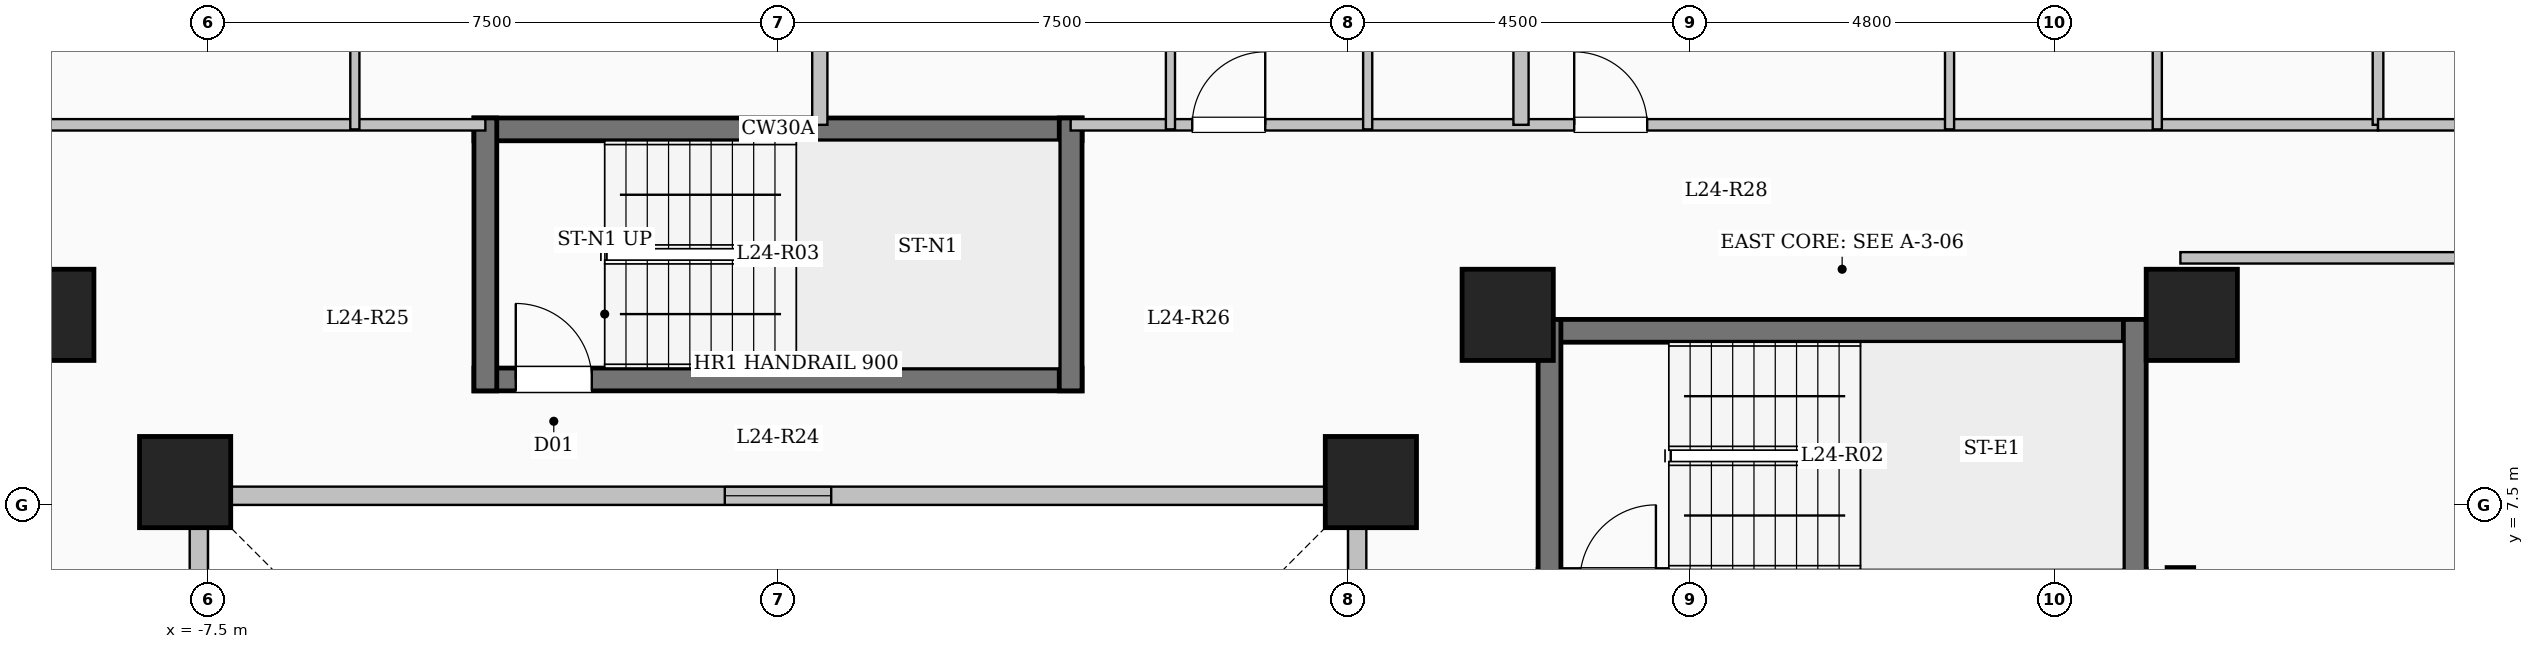
"""IFC4 building model, lengths in metres.
Left out: names, types, materials, properties, quantities, classifications, styles, units other than length and angle.
Written with IfcOpenShell. Run it as: python <this file> out.ifc"""

import sys

from ifc_helpers import new_model, si_unit, direction, frame, frame_2d, origin, origin_2d, place, context, subcontext, project, spatial, rectangle, extrude, element, fill, save


model = new_model("IFC4")
c1 = context("Model", 3, precision=1e-05, world=origin(), true_north=direction((0.0, 1.0)))
c2 = subcontext(c1, "Body", "Model", "MODEL_VIEW")
j1 = project(units=[si_unit("LENGTHUNIT", "METRE"), si_unit("PLANEANGLEUNIT", "RADIAN")], contexts=[c1])
p1 = place(None, origin())
s1 = spatial("IfcSite", under=j1, at=p1, CompositionType="ELEMENT")
p2 = place(p1, origin())
s2 = spatial("IfcBuilding", under=s1, at=p2, CompositionType="ELEMENT")
p3 = place(p2, frame((0.0, 0.0, 91.7)))
s3 = spatial("IfcBuildingStorey", under=s2, at=p3, CompositionType="ELEMENT", Elevation=91.7)
for number, where, z_axis, x_axis in (
    (1, (-7.8, 7.8, 0.0), (0.0, 0.0, 1.0), (1.0, 0.0, 0.0)),
    (2, (7.8, 7.8, 0.0), (0.0, 0.0, 1.0), (1.0, 0.0, 0.0)),
    (3, (-9.6, 10.0, 0.0), (0.0, 0.0, 1.0), (1.0, 0.0, 0.0)),
    (4, (9.6, 10.0, 0.0), (0.0, 0.0, 1.0), (1.0, 0.0, 0.0)),
    (5, (18.6, 10.0, 0.0), (0.0, 0.0, 1.0), (1.0, 0.0, 0.0)),
):
    element("IfcColumn", number, at=place(p3, frame(where, z_axis=z_axis, x_axis=x_axis)), inside=s3, PredefinedType="COLUMN", context=c2, shape_type="SweptSolid", body=[
        extrude(rectangle(XDim=1.2, YDim=1.2, at=origin_2d()), origin(), (0.0, 0.0, 1.0), 3.35),
    ])
p4 = place(p3, frame((7.62, -7.62, 0.0), z_axis=(0.0, 0.0, 1.0), x_axis=(0.0, 1.0, 0.0)))
e6 = element("IfcWall", 6, at=p4, inside=s3, PredefinedType="SOLIDWALL", context=c2, shape_type="SweptSolid", body=[
    extrude(rectangle(XDim=15.24, YDim=0.24, at=frame_2d((7.62, 0.0))), origin(), (0.0, 0.0, 1.0), 3.1),
])
p5 = place(p4, frame((6.92, 0.0, 0.95)))
e7 = element("IfcOpeningElement", 7, at=p5, cuts=e6, PredefinedType="OPENING", context=c2, shape_type="SweptSolid", body=[
    extrude(rectangle(XDim=1.4, YDim=1.5, at=frame_2d((0.7, 0.75))), frame((0.0, 0.13, 0.0), z_axis=(0.0, -1.0, 0.0), x_axis=(1.0, 0.0, 0.0)), (0.0, 0.0, 1.0), 0.26),
])
p6 = place(p3, frame((7.62, 7.62, 0.0), z_axis=(0.0, 0.0, 1.0), x_axis=(-1.0, 0.0, 0.0)))
e8 = element("IfcWall", 8, at=p6, inside=s3, PredefinedType="SOLIDWALL", context=c2, shape_type="SweptSolid", body=[
    extrude(rectangle(XDim=15.24, YDim=0.24, at=frame_2d((7.62, 0.0))), origin(), (0.0, 0.0, 1.0), 3.1),
])
p7 = place(p6, frame((6.92, 0.0, 0.95)))
e9 = element("IfcOpeningElement", 9, at=p7, cuts=e8, PredefinedType="OPENING", context=c2, shape_type="SweptSolid", body=[
    extrude(rectangle(XDim=1.4, YDim=1.5, at=frame_2d((0.7, 0.75))), frame((0.0, 0.13, 0.0), z_axis=(0.0, -1.0, 0.0), x_axis=(1.0, 0.0, 0.0)), (0.0, 0.0, 1.0), 0.26),
])
p8 = place(p3, frame((-7.62, 7.62, 0.0), z_axis=(0.0, 0.0, 1.0), x_axis=(0.0, -1.0, 0.0)))
e10 = element("IfcWall", 10, at=p8, inside=s3, PredefinedType="SOLIDWALL", context=c2, shape_type="SweptSolid", body=[
    extrude(rectangle(XDim=15.24, YDim=0.24, at=frame_2d((7.62, 0.0))), origin(), (0.0, 0.0, 1.0), 3.1),
])
p9 = place(p8, frame((6.92, 0.0, 0.95)))
e11 = element("IfcOpeningElement", 11, at=p9, cuts=e10, PredefinedType="OPENING", context=c2, shape_type="SweptSolid", body=[
    extrude(rectangle(XDim=1.4, YDim=1.5, at=frame_2d((0.7, 0.75))), frame((0.0, 0.13, 0.0), z_axis=(0.0, -1.0, 0.0), x_axis=(1.0, 0.0, 0.0)), (0.0, 0.0, 1.0), 0.26),
])
p10 = place(p3, frame((10.0, 9.79, 0.0), z_axis=(0.0, 0.0, 1.0), x_axis=(1.0, 0.0, 0.0)))
e12 = element("IfcWall", 12, at=p10, inside=s3, PredefinedType="SHEAR", context=c2, shape_type="SweptSolid", body=[
    extrude(rectangle(XDim=8.0, YDim=0.3, at=frame_2d((4.0, 0.0))), origin(), (0.0, 0.0, 1.0), 3.35),
])
p11 = place(p3, frame((10.0, 6.5, 0.0), z_axis=(0.0, 0.0, 1.0), x_axis=(1.0, 0.0, 0.0)))
e13 = element("IfcWall", 13, at=p11, inside=s3, PredefinedType="SHEAR", context=c2, shape_type="SweptSolid", body=[
    extrude(rectangle(XDim=8.0, YDim=0.3, at=frame_2d((4.0, 0.0))), origin(), (0.0, 0.0, 1.0), 3.35),
])
p12 = place(p11, frame((0.55, 0.0, 0.0)))
e14 = element("IfcOpeningElement", 14, at=p12, cuts=e13, PredefinedType="OPENING", context=c2, shape_type="SweptSolid", body=[
    extrude(rectangle(XDim=1.0, YDim=2.15, at=frame_2d((0.5, 1.075))), frame((0.0, 0.16, 0.0), z_axis=(0.0, -1.0, 0.0), x_axis=(1.0, 0.0, 0.0)), (0.0, 0.0, 1.0), 0.32),
])
for number, where, z_axis, x_axis in (
    (15, (10.15, 6.35, 0.0), (0.0, 0.0, 1.0), (0.0, 1.0, 0.0)),
    (16, (17.85, 6.35, 0.0), (0.0, 0.0, 1.0), (0.0, 1.0, 0.0)),
):
    element("IfcWall", number, at=place(p3, frame(where, z_axis=z_axis, x_axis=x_axis)), inside=s3, PredefinedType="SHEAR", context=c2, shape_type="SweptSolid", body=[
        extrude(rectangle(XDim=3.59, YDim=0.3, at=frame_2d((1.795, 0.0))), origin(), (0.0, 0.0, 1.0), 3.35),
    ])
p13 = place(p3, frame((-4.0, 12.44, 0.0), z_axis=(0.0, 0.0, 1.0), x_axis=(1.0, 0.0, 0.0)))
e17 = element("IfcWall", 17, at=p13, inside=s3, PredefinedType="SHEAR", context=c2, shape_type="SweptSolid", body=[
    extrude(rectangle(XDim=8.0, YDim=0.3, at=frame_2d((4.0, 0.0))), origin(), (0.0, 0.0, 1.0), 3.35),
])
p14 = place(p3, frame((-4.0, 9.15, 0.0), z_axis=(0.0, 0.0, 1.0), x_axis=(1.0, 0.0, 0.0)))
e18 = element("IfcWall", 18, at=p14, inside=s3, PredefinedType="SHEAR", context=c2, shape_type="SweptSolid", body=[
    extrude(rectangle(XDim=8.0, YDim=0.3, at=frame_2d((4.0, 0.0))), origin(), (0.0, 0.0, 1.0), 3.35),
])
p15 = place(p14, frame((0.55, 0.0, 0.0)))
e19 = element("IfcOpeningElement", 19, at=p15, cuts=e18, PredefinedType="OPENING", context=c2, shape_type="SweptSolid", body=[
    extrude(rectangle(XDim=1.0, YDim=2.15, at=frame_2d((0.5, 1.075))), frame((0.0, 0.16, 0.0), z_axis=(0.0, -1.0, 0.0), x_axis=(1.0, 0.0, 0.0)), (0.0, 0.0, 1.0), 0.32),
])
for number, where, z_axis, x_axis in (
    (20, (-3.85, 9.0, 0.0), (0.0, 0.0, 1.0), (0.0, 1.0, 0.0)),
    (21, (3.85, 9.0, 0.0), (0.0, 0.0, 1.0), (0.0, 1.0, 0.0)),
):
    element("IfcWall", number, at=place(p3, frame(where, z_axis=z_axis, x_axis=x_axis)), inside=s3, PredefinedType="SHEAR", context=c2, shape_type="SweptSolid", body=[
        extrude(rectangle(XDim=3.59, YDim=0.3, at=frame_2d((1.795, 0.0))), origin(), (0.0, 0.0, 1.0), 3.35),
    ])
p16 = place(p3, frame((18.45, -7.375, 0.0), z_axis=(0.0, 0.0, 1.0), x_axis=(0.0, 1.0, 0.0)))
e22 = element("IfcWall", 22, at=p16, inside=s3, PredefinedType="SHEAR", context=c2, shape_type="SweptSolid", body=[
    extrude(rectangle(XDim=14.05, YDim=0.35, at=frame_2d((7.025, 0.0))), origin(), (0.0, 0.0, 1.0), 3.35),
])
p17 = place(p3, frame((-21.05, 12.5, 0.0), z_axis=(0.0, 0.0, 1.0), x_axis=(1.0, 0.0, 0.0)))
e23 = element("IfcWall", 23, at=p17, inside=s3, PredefinedType="PARTITIONING", context=c2, shape_type="SweptSolid", body=[
    extrude(rectangle(XDim=17.2, YDim=0.15, at=frame_2d((8.6, 0.0))), origin(), (0.0, 0.0, 1.0), 3.1),
])
p18 = place(p17, frame((0.7, 0.0, 0.0)))
e24 = element("IfcOpeningElement", 24, at=p18, cuts=e23, PredefinedType="OPENING", context=c2, shape_type="SweptSolid", body=[
    extrude(rectangle(XDim=0.96, YDim=2.15, at=frame_2d((0.48, 1.075))), frame((0.0, 0.085, 0.0), z_axis=(0.0, -1.0, 0.0), x_axis=(1.0, 0.0, 0.0)), (0.0, 0.0, 1.0), 0.17),
])
p19 = place(p3, frame((3.85, 12.5, 0.0), z_axis=(0.0, 0.0, 1.0), x_axis=(1.0, 0.0, 0.0)))
e25 = element("IfcWall", 25, at=p19, inside=s3, PredefinedType="PARTITIONING", context=c2, shape_type="SweptSolid", body=[
    extrude(rectangle(XDim=17.2, YDim=0.15, at=frame_2d((8.6, 0.0))), origin(), (0.0, 0.0, 1.0), 3.1),
])
p20 = place(p19, frame((1.6, 0.0, 0.0)))
e26 = element("IfcOpeningElement", 26, at=p20, cuts=e25, PredefinedType="OPENING", context=c2, shape_type="SweptSolid", body=[
    extrude(rectangle(XDim=0.96, YDim=2.15, at=frame_2d((0.48, 1.075))), frame((0.0, 0.085, 0.0), z_axis=(0.0, -1.0, 0.0), x_axis=(1.0, 0.0, 0.0)), (0.0, 0.0, 1.0), 0.17),
])
p21 = place(p19, frame((6.625, 0.0, 0.0)))
e27 = element("IfcOpeningElement", 27, at=p21, cuts=e25, PredefinedType="OPENING", context=c2, shape_type="SweptSolid", body=[
    extrude(rectangle(XDim=0.96, YDim=2.15, at=frame_2d((0.48, 1.075))), frame((0.0, 0.085, 0.0), z_axis=(0.0, -1.0, 0.0), x_axis=(1.0, 0.0, 0.0)), (0.0, 0.0, 1.0), 0.17),
])
p22 = place(p3, frame((0.55, 12.5, 0.0), z_axis=(0.0, 0.0, 1.0), x_axis=(0.0, 1.0, 0.0)))
e28 = element("IfcWall", 28, at=p22, inside=s3, PredefinedType="SOLIDWALL", context=c2, shape_type="SweptSolid", body=[
    extrude(rectangle(XDim=11.08, YDim=0.2, at=frame_2d((5.54, 0.0))), origin(), (0.0, 0.0, 1.0), 3.1),
])
p23 = place(p3, frame((-5.567, 12.44, 0.0), z_axis=(0.0, 0.0, 1.0), x_axis=(0.0, 1.0, 0.0)))
e29 = element("IfcWall", 29, at=p23, inside=s3, PredefinedType="PARTITIONING", context=c2, shape_type="SweptSolid", body=[
    extrude(rectangle(XDim=2.62, YDim=0.12, at=frame_2d((1.31, 0.0))), origin(), (0.0, 0.0, 1.0), 3.1),
])
p24 = place(p3, frame((9.775, 12.5, 0.0), z_axis=(0.0, 0.0, 1.0), x_axis=(0.0, 1.0, 0.0)))
e30 = element("IfcWall", 30, at=p24, inside=s3, PredefinedType="SOLIDWALL", context=c2, shape_type="SweptSolid", body=[
    extrude(rectangle(XDim=9.902, YDim=0.2, at=frame_2d((4.951, 0.0))), origin(), (0.0, 0.0, 1.0), 3.1),
])
p25 = place(p3, frame((5.163, 12.44, 0.0), z_axis=(0.0, 0.0, 1.0), x_axis=(0.0, 1.0, 0.0)))
e31 = element("IfcWall", 31, at=p25, inside=s3, PredefinedType="PARTITIONING", context=c2, shape_type="SweptSolid", body=[
    extrude(rectangle(XDim=11.1, YDim=0.12, at=frame_2d((5.55, 0.0))), origin(), (0.0, 0.0, 1.0), 3.1),
])
p26 = place(p25, frame((3.075, 0.0, 0.0)))
e32 = element("IfcOpeningElement", 32, at=p26, cuts=e31, PredefinedType="OPENING", context=c2, shape_type="SweptSolid", body=[
    extrude(rectangle(XDim=1.08, YDim=2.15, at=frame_2d((0.54, 1.075))), frame((0.0, 0.07, 0.0), z_axis=(0.0, -1.0, 0.0), x_axis=(1.0, 0.0, 0.0)), (0.0, 0.0, 1.0), 0.14),
])
p27 = place(p3, frame((7.758, 12.44, 0.0), z_axis=(0.0, 0.0, 1.0), x_axis=(0.0, 1.0, 0.0)))
e33 = element("IfcWall", 33, at=p27, inside=s3, PredefinedType="PARTITIONING", context=c2, shape_type="SweptSolid", body=[
    extrude(rectangle(XDim=2.79, YDim=0.12, at=frame_2d((1.395, 0.0))), origin(), (0.0, 0.0, 1.0), 2.435),
])
p28 = place(p3, frame((15.413, 12.44, 0.0), z_axis=(0.0, 0.0, 1.0), x_axis=(0.0, 1.0, 0.0)))
e34 = element("IfcWall", 34, at=p28, inside=s3, PredefinedType="PARTITIONING", context=c2, shape_type="SweptSolid", body=[
    extrude(rectangle(XDim=9.66, YDim=0.12, at=frame_2d((4.83, 0.0))), origin(), (0.0, 0.0, 1.0), 3.1),
])
p29 = place(p28, frame((3.245, 0.0, 0.0)))
e35 = element("IfcOpeningElement", 35, at=p29, cuts=e34, PredefinedType="OPENING", context=c2, shape_type="SweptSolid", body=[
    extrude(rectangle(XDim=1.08, YDim=2.15, at=frame_2d((0.54, 1.075))), frame((0.0, 0.07, 0.0), z_axis=(0.0, -1.0, 0.0), x_axis=(1.0, 0.0, 0.0)), (0.0, 0.0, 1.0), 0.14),
])
p30 = place(p3, frame((18.146, 12.44, 0.0), z_axis=(0.0, 0.0, 1.0), x_axis=(0.0, 1.0, 0.0)))
e36 = element("IfcWall", 36, at=p30, inside=s3, PredefinedType="PARTITIONING", context=c2, shape_type="SweptSolid", body=[
    extrude(rectangle(XDim=2.96, YDim=0.12, at=frame_2d((1.48, 0.0))), origin(), (0.0, 0.0, 1.0), 3.1),
])
p31 = place(p3, frame((18.45, 10.75, 0.0), z_axis=(0.0, 0.0, 1.0), x_axis=(1.0, 0.0, 0.0)))
e37 = element("IfcWall", 37, at=p31, inside=s3, PredefinedType="PARTITIONING", context=c2, shape_type="SweptSolid", body=[
    extrude(rectangle(XDim=8.43, YDim=0.15, at=frame_2d((4.215, 0.0))), origin(), (0.0, 0.0, 1.0), 3.1),
])
p32 = place(p3, frame((21.05, 12.5, 0.0), z_axis=(0.0, 0.0, 1.0), x_axis=(0.0, 1.0, 0.0)))
e38 = element("IfcWall", 38, at=p32, inside=s3, PredefinedType="PARTITIONING", context=c2, shape_type="SweptSolid", body=[
    extrude(rectangle(XDim=5.35, YDim=0.14, at=frame_2d((2.675, 0.0))), origin(), (0.0, 0.0, 1.0), 3.1),
])
p33 = place(p3, frame((21.05, 12.5, 0.0), z_axis=(0.0, 0.0, 1.0), x_axis=(1.0, 0.0, 0.0)))
e39 = element("IfcWall", 39, at=p33, inside=s3, PredefinedType="PARTITIONING", context=c2, shape_type="SweptSolid", body=[
    extrude(rectangle(XDim=5.83, YDim=0.15, at=frame_2d((2.915, 0.0))), origin(), (0.0, 0.0, 1.0), 3.1),
])
p34 = place(p33, frame((2.44, 0.0, 0.0)))
e40 = element("IfcOpeningElement", 40, at=p34, cuts=e39, PredefinedType="OPENING", context=c2, shape_type="SweptSolid", body=[
    extrude(rectangle(XDim=0.95, YDim=2.15, at=frame_2d((0.475, 1.075))), frame((0.0, 0.085, 0.0), z_axis=(0.0, -1.0, 0.0), x_axis=(1.0, 0.0, 0.0)), (0.0, 0.0, 1.0), 0.17),
])
p35 = place(p7, origin())
e41 = element("IfcWindow", 41, at=p35, inside=s3, PartitioningType="SINGLE_PANEL", PredefinedType="WINDOW", context=c2, shape_type="SweptSolid", body=[
    extrude(rectangle(XDim=1.4, YDim=1.5, at=frame_2d((0.7, 0.75))), frame((0.0, 0.03, 0.0), z_axis=(0.0, -1.0, 0.0), x_axis=(1.0, 0.0, 0.0)), (0.0, 0.0, 1.0), 0.06),
])
fill(e9, e41)
p36 = place(p15, origin())
e42 = element("IfcDoor", 42, at=p36, inside=s3, OperationType="SINGLE_SWING_LEFT", PredefinedType="DOOR", context=c2, shape_type="SweptSolid", body=[
    extrude(rectangle(XDim=1.0, YDim=2.15, at=frame_2d((0.5, 1.075))), frame((0.0, 0.025, 0.0), z_axis=(0.0, -1.0, 0.0), x_axis=(1.0, 0.0, 0.0)), (0.0, 0.0, 1.0), 0.05),
])
fill(e19, e42)
p37 = place(p20, origin())
e43 = element("IfcDoor", 43, at=p37, inside=s3, OperationType="SINGLE_SWING_RIGHT", PredefinedType="DOOR", context=c2, shape_type="SweptSolid", body=[
    extrude(rectangle(XDim=0.96, YDim=2.15, at=frame_2d((0.48, 1.075))), frame((0.0, 0.025, 0.0), z_axis=(0.0, -1.0, 0.0), x_axis=(1.0, 0.0, 0.0)), (0.0, 0.0, 1.0), 0.05),
])
fill(e26, e43)
p38 = place(p21, origin())
e44 = element("IfcDoor", 44, at=p38, inside=s3, OperationType="SINGLE_SWING_LEFT", PredefinedType="DOOR", context=c2, shape_type="SweptSolid", body=[
    extrude(rectangle(XDim=0.96, YDim=2.15, at=frame_2d((0.48, 1.075))), frame((0.0, 0.025, 0.0), z_axis=(0.0, -1.0, 0.0), x_axis=(1.0, 0.0, 0.0)), (0.0, 0.0, 1.0), 0.05),
])
fill(e27, e44)
save(model, sys.argv[1])
